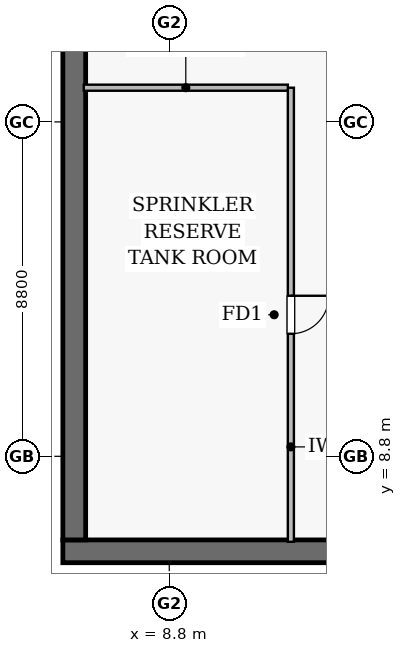
"""IFC4 building model, lengths in metres.
Left out: names, types, materials, properties, quantities, classifications, styles, units other than length and angle.
Written with IfcOpenShell. Run it as: python <this file> out.ifc"""

import sys

from ifc_helpers import new_model, si_unit, direction, frame, frame_2d, origin, place, context, subcontext, project, spatial, rectangle, extrude, element, fill, save


model = new_model("IFC4")
c1 = context("Model", 3, precision=1e-05, world=origin(), true_north=direction((0.0, 1.0)))
c2 = subcontext(c1, "Body", "Model", "MODEL_VIEW")
j1 = project(units=[si_unit("LENGTHUNIT", "METRE"), si_unit("PLANEANGLEUNIT", "RADIAN")], contexts=[c1])
p1 = place(None, origin())
s1 = spatial("IfcSite", under=j1, at=p1, CompositionType="ELEMENT")
p2 = place(p1, origin())
s2 = spatial("IfcBuilding", under=s1, at=p2, CompositionType="ELEMENT")
p3 = place(p2, frame((0.0, 0.0, -15.6)))
s3 = spatial("IfcBuildingStorey", under=s2, at=p3, CompositionType="ELEMENT", Elevation=-15.6)
p4 = place(p3, frame((6.0, 6.3, 0.0), z_axis=(0.0, 0.0, 1.0), x_axis=(1.0, 0.0, 0.0)))
e1 = element("IfcWall", 1, at=p4, inside=s3, PredefinedType="SOLIDWALL", context=c2, shape_type="SweptSolid", body=[
    extrude(rectangle(XDim=76.0, YDim=0.6, at=frame_2d((38.0, 0.0))), origin(), (0.0, 0.0, 1.0), 3.58),
])
p5 = place(p3, frame((6.3, 81.4, 0.0), z_axis=(0.0, 0.0, 1.0), x_axis=(0.0, -1.0, 0.0)))
e2 = element("IfcWall", 2, at=p5, inside=s3, PredefinedType="SOLIDWALL", context=c2, shape_type="SweptSolid", body=[
    extrude(rectangle(XDim=74.8, YDim=0.6, at=frame_2d((37.4, 0.0))), origin(), (0.0, 0.0, 1.0), 3.58),
])
p6 = place(p3, frame((12.0, 18.5, 0.0), z_axis=(0.0, 0.0, 1.0), x_axis=(0.0, -1.0, 0.0)))
e3 = element("IfcWall", 3, at=p6, inside=s3, PredefinedType="SOLIDWALL", context=c2, shape_type="SweptSolid", body=[
    extrude(rectangle(XDim=11.95, YDim=0.16, at=frame_2d((5.975, 0.0))), origin(), (0.0, 0.0, 1.0), 3.58),
])
p7 = place(p6, frame((5.475, 0.0, 0.0)))
e4 = element("IfcOpeningElement", 4, at=p7, cuts=e3, PredefinedType="OPENING", context=c2, shape_type="SweptSolid", body=[
    extrude(rectangle(XDim=1.0, YDim=2.15, at=frame_2d((0.5, 1.075))), frame((0.0, 0.09, 0.0), z_axis=(0.0, -1.0, 0.0), x_axis=(1.0, 0.0, 0.0)), (0.0, 0.0, 1.0), 0.18),
])
p8 = place(p3, frame((6.55, 18.5, 0.0), z_axis=(0.0, 0.0, 1.0), x_axis=(1.0, 0.0, 0.0)))
e5 = element("IfcWall", 5, at=p8, inside=s3, PredefinedType="SOLIDWALL", context=c2, shape_type="SweptSolid", body=[
    extrude(rectangle(XDim=5.37, YDim=0.16, at=frame_2d((2.685, 0.0))), origin(), (0.0, 0.0, 1.0), 3.58),
])
p9 = place(p7, origin())
e6 = element("IfcDoor", 6, at=p9, inside=s3, OperationType="SINGLE_SWING_LEFT", PredefinedType="DOOR", context=c2, shape_type="SweptSolid", body=[
    extrude(rectangle(XDim=1.0, YDim=2.15, at=frame_2d((0.5, 1.075))), frame((0.0, 0.025, 0.0), z_axis=(0.0, -1.0, 0.0), x_axis=(1.0, 0.0, 0.0)), (0.0, 0.0, 1.0), 0.05),
])
fill(e4, e6)
save(model, sys.argv[1])
